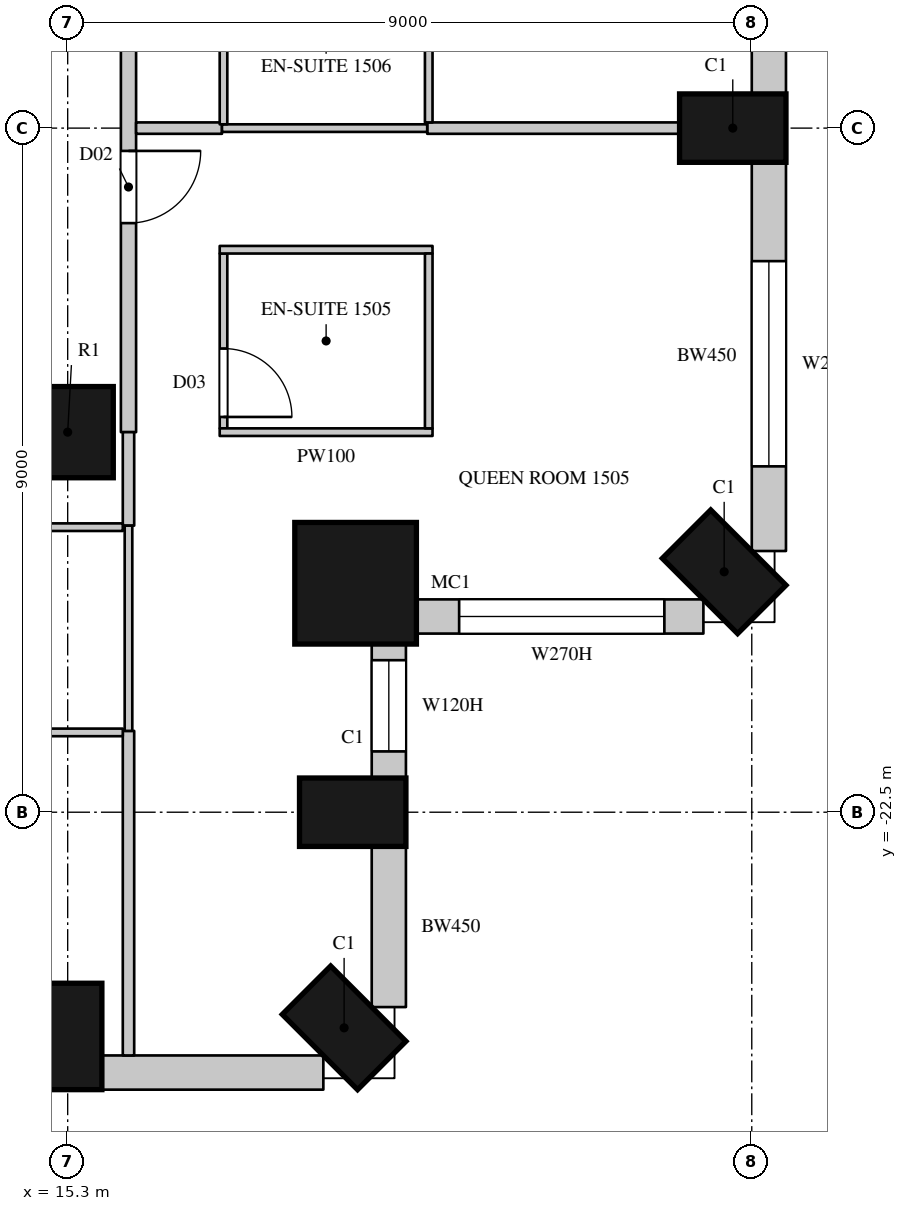
"""IFC4 building model, lengths in metres.
Left out: names, types, materials, properties, quantities, classifications, styles, units other than length and angle.
Written with IfcOpenShell. Run it as: python <this file> out.ifc"""

import sys

from ifc_helpers import new_model, si_unit, direction, frame, frame_2d, origin, origin_2d, place, context, subcontext, project, spatial, rectangle, circle, extrude, element, fill, save


model = new_model("IFC4")
c1 = context("Model", 3, precision=1e-05, world=origin(), true_north=direction((0.0, 1.0)))
c2 = subcontext(c1, "Body", "Model", "MODEL_VIEW")
j1 = project(units=[si_unit("LENGTHUNIT", "METRE"), si_unit("PLANEANGLEUNIT", "RADIAN")], contexts=[c1])
p1 = place(None, origin())
s1 = spatial("IfcSite", under=j1, at=p1, CompositionType="ELEMENT")
p2 = place(p1, origin())
s2 = spatial("IfcBuilding", under=s1, at=p2, CompositionType="ELEMENT")
p3 = place(p2, frame((0.0, 0.0, 84.3)))
s3 = spatial("IfcBuildingStorey", under=s2, at=p3, CompositionType="ELEMENT", Elevation=84.3)
for number, where, z_axis, x_axis in (
    (1, (15.3, -25.45, 0.0), (0.0, 0.0, 1.0), (1.0, 0.0, 0.0)),
    (2, (18.937, -25.337, 0.0), (0.0, 0.0, 1.0), (0.707, 0.707, 0.0)),
    (3, (19.05, -22.5, 0.0), (0.0, 0.0, 1.0), (0.0, 1.0, 0.0)),
):
    element("IfcColumn", number, at=place(p3, frame(where, z_axis=z_axis, x_axis=x_axis)), inside=s3, PredefinedType="COLUMN", context=c2, shape_type="SweptSolid", body=[
        extrude(rectangle(XDim=0.9, YDim=1.4, at=origin_2d()), origin(), (0.0, 0.0, 1.0), 3.6),
    ])
p4 = place(p3, frame((19.088, -19.488, 0.0), z_axis=(0.0, 0.0, 1.0), x_axis=(1.0, 0.0, 0.0)))
e4 = element("IfcColumn", 4, at=p4, inside=s3, PredefinedType="COLUMN", context=c2, shape_type="SweptSolid", body=[
    extrude(circle(Radius=0.8, at=origin_2d()), origin(), (0.0, 0.0, 1.0), 3.6),
])
for number, where, z_axis, x_axis in (
    (5, (23.937, -19.337, 0.0), (0.0, 0.0, 1.0), (0.707, 0.707, 0.0)),
    (6, (24.05, -13.5, 0.0), (0.0, 0.0, 1.0), (0.0, 1.0, 0.0)),
):
    element("IfcColumn", number, at=place(p3, frame(where, z_axis=z_axis, x_axis=x_axis)), inside=s3, PredefinedType="COLUMN", context=c2, shape_type="SweptSolid", body=[
        extrude(rectangle(XDim=0.9, YDim=1.4, at=origin_2d()), origin(), (0.0, 0.0, 1.0), 3.6),
    ])
p5 = place(p3, frame((15.3, -17.5, 0.0), z_axis=(0.0, 0.0, 1.0), x_axis=(1.0, 0.0, 0.0)))
e7 = element("IfcColumn", 7, at=p5, inside=s3, PredefinedType="COLUMN", context=c2, shape_type="SweptSolid", body=[
    extrude(circle(Radius=0.6, at=origin_2d()), origin(), (0.0, 0.0, 1.0), 3.6),
])
p6 = place(p3, frame((15.75, -25.925, 0.0), z_axis=(0.0, 0.0, 1.0), x_axis=(1.0, 0.0, 0.0)))
e8 = element("IfcWall", 8, at=p6, inside=s3, PredefinedType="SOLIDWALL", context=c2, shape_type="SweptSolid", body=[
    extrude(rectangle(XDim=2.914, YDim=0.45, at=frame_2d((1.457, 0.0))), origin(), (0.0, 0.0, 1.0), 3.3),
])
p7 = place(p3, frame((19.525, -25.064, 0.0), z_axis=(0.0, 0.0, 1.0), x_axis=(0.0, 1.0, 0.0)))
e9 = element("IfcWall", 9, at=p7, inside=s3, PredefinedType="SOLIDWALL", context=c2, shape_type="SweptSolid", body=[
    extrude(rectangle(XDim=2.114, YDim=0.45, at=frame_2d((1.057, 0.0))), origin(), (0.0, 0.0, 1.0), 3.3),
])
p8 = place(p3, frame((19.525, -22.05, 0.0), z_axis=(0.0, 0.0, 1.0), x_axis=(0.0, 1.0, 0.0)))
e10 = element("IfcWall", 10, at=p8, inside=s3, PredefinedType="SOLIDWALL", context=c2, shape_type="SweptSolid", body=[
    extrude(rectangle(XDim=1.792, YDim=0.45, at=frame_2d((0.896, 0.0))), origin(), (0.0, 0.0, 1.0), 3.3),
])
p9 = place(p8, frame((0.35, 0.0, 1.05)))
e11 = element("IfcOpeningElement", 11, at=p9, cuts=e10, PredefinedType="OPENING", context=c2, shape_type="SweptSolid", body=[
    extrude(rectangle(XDim=1.2, YDim=2.0, at=frame_2d((0.6, 1.0))), frame((0.0, 0.235, 0.0), z_axis=(0.0, -1.0, 0.0), x_axis=(1.0, 0.0, 0.0)), (0.0, 0.0, 1.0), 0.47),
])
p10 = place(p3, frame((19.858, -19.925, 0.0), z_axis=(0.0, 0.0, 1.0), x_axis=(1.0, 0.0, 0.0)))
e12 = element("IfcWall", 12, at=p10, inside=s3, PredefinedType="SOLIDWALL", context=c2, shape_type="SweptSolid", body=[
    extrude(rectangle(XDim=3.805, YDim=0.45, at=frame_2d((1.903, 0.0))), origin(), (0.0, 0.0, 1.0), 3.3),
])
p11 = place(p10, frame((0.592, 0.0, 1.05)))
e13 = element("IfcOpeningElement", 13, at=p11, cuts=e12, PredefinedType="OPENING", context=c2, shape_type="SweptSolid", body=[
    extrude(rectangle(XDim=2.7, YDim=2.0, at=frame_2d((1.35, 1.0))), frame((0.0, 0.235, 0.0), z_axis=(0.0, -1.0, 0.0), x_axis=(1.0, 0.0, 0.0)), (0.0, 0.0, 1.0), 0.47),
])
p12 = place(p3, frame((24.525, -19.064, 0.0), z_axis=(0.0, 0.0, 1.0), x_axis=(0.0, 1.0, 0.0)))
e14 = element("IfcWall", 14, at=p12, inside=s3, PredefinedType="SOLIDWALL", context=c2, shape_type="SweptSolid", body=[
    extrude(rectangle(XDim=5.114, YDim=0.45, at=frame_2d((2.557, 0.0))), origin(), (0.0, 0.0, 1.0), 3.3),
])
p13 = place(p12, frame((1.114, 0.0, 1.05)))
e15 = element("IfcOpeningElement", 15, at=p13, cuts=e14, PredefinedType="OPENING", context=c2, shape_type="SweptSolid", body=[
    extrude(rectangle(XDim=2.7, YDim=2.0, at=frame_2d((1.35, 1.0))), frame((0.0, 0.235, 0.0), z_axis=(0.0, -1.0, 0.0), x_axis=(1.0, 0.0, 0.0)), (0.0, 0.0, 1.0), 0.47),
])
p14 = place(p3, frame((24.525, -13.05, 0.0), z_axis=(0.0, 0.0, 1.0), x_axis=(0.0, 1.0, 0.0)))
e16 = element("IfcWall", 16, at=p14, inside=s3, PredefinedType="SOLIDWALL", context=c2, shape_type="SweptSolid", body=[
    extrude(rectangle(XDim=8.1, YDim=0.45, at=frame_2d((4.05, 0.0))), origin(), (0.0, 0.0, 1.0), 3.3),
])
p15 = place(p14, frame((0.9, 0.0, 0.0)))
e17 = element("IfcOpeningElement", 17, at=p15, cuts=e16, PredefinedType="OPENING", context=c2, shape_type="SweptSolid", body=[
    extrude(rectangle(XDim=1.8, YDim=2.4, at=frame_2d((0.9, 1.2))), frame((0.0, 0.235, 0.0), z_axis=(0.0, -1.0, 0.0), x_axis=(1.0, 0.0, 0.0)), (0.0, 0.0, 1.0), 0.47),
])
p16 = place(p14, frame((4.7, 0.0, 0.0)))
e18 = element("IfcOpeningElement", 18, at=p16, cuts=e16, PredefinedType="OPENING", context=c2, shape_type="SweptSolid", body=[
    extrude(rectangle(XDim=1.8, YDim=2.4, at=frame_2d((0.9, 1.2))), frame((0.0, 0.235, 0.0), z_axis=(0.0, -1.0, 0.0), x_axis=(1.0, 0.0, 0.0)), (0.0, 0.0, 1.0), 0.47),
])
p17 = place(p14, frame((6.7, 0.0, 1.05)))
e19 = element("IfcOpeningElement", 19, at=p17, cuts=e16, PredefinedType="OPENING", context=c2, shape_type="SweptSolid", body=[
    extrude(rectangle(XDim=1.2, YDim=2.0, at=frame_2d((0.6, 1.0))), frame((0.0, 0.235, 0.0), z_axis=(0.0, -1.0, 0.0), x_axis=(1.0, 0.0, 0.0)), (0.0, 0.0, 1.0), 0.47),
])
p18 = place(p3, frame((16.1, -17.5, 0.0), z_axis=(0.0, 0.0, 1.0), x_axis=(0.0, 1.0, 0.0)))
e20 = element("IfcWall", 20, at=p18, inside=s3, PredefinedType="PARTITIONING", context=c2, shape_type="SweptSolid", body=[
    extrude(rectangle(XDim=12.75, YDim=0.2, at=frame_2d((6.375, 0.0))), origin(), (0.0, 0.0, 1.0), 3.3),
])
p19 = place(p18, frame((2.75, 0.0, 0.0)))
e21 = element("IfcOpeningElement", 21, at=p19, cuts=e20, PredefinedType="OPENING", context=c2, shape_type="SweptSolid", body=[
    extrude(rectangle(XDim=0.95, YDim=2.2, at=frame_2d((0.475, 1.1))), frame((0.0, 0.11, 0.0), z_axis=(0.0, -1.0, 0.0), x_axis=(1.0, 0.0, 0.0)), (0.0, 0.0, 1.0), 0.22),
])
p20 = place(p18, frame((6.95, 0.0, 0.0)))
e22 = element("IfcOpeningElement", 22, at=p20, cuts=e20, PredefinedType="OPENING", context=c2, shape_type="SweptSolid", body=[
    extrude(rectangle(XDim=0.95, YDim=2.2, at=frame_2d((0.475, 1.1))), frame((0.0, 0.11, 0.0), z_axis=(0.0, -1.0, 0.0), x_axis=(1.0, 0.0, 0.0)), (0.0, 0.0, 1.0), 0.22),
])
p21 = place(p18, frame((11.4, 0.0, 0.0)))
e23 = element("IfcOpeningElement", 23, at=p21, cuts=e20, PredefinedType="OPENING", context=c2, shape_type="SweptSolid", body=[
    extrude(rectangle(XDim=0.95, YDim=2.2, at=frame_2d((0.475, 1.1))), frame((0.0, 0.11, 0.0), z_axis=(0.0, -1.0, 0.0), x_axis=(1.0, 0.0, 0.0)), (0.0, 0.0, 1.0), 0.22),
])
p22 = place(p3, frame((16.1, -25.7, 0.0), z_axis=(0.0, 0.0, 1.0), x_axis=(0.0, 1.0, 0.0)))
e24 = element("IfcWall", 24, at=p22, inside=s3, PredefinedType="PARTITIONING", context=c2, shape_type="SweptSolid", body=[
    extrude(rectangle(XDim=4.27, YDim=0.15, at=frame_2d((2.135, 0.0))), origin(), (0.0, 0.0, 1.0), 3.3),
])
p23 = place(p3, frame((16.1, -18.73, 0.0), z_axis=(0.0, 0.0, 1.0), x_axis=(0.0, 1.0, 0.0)))
e25 = element("IfcWall", 25, at=p23, inside=s3, PredefinedType="PARTITIONING", context=c2, shape_type="SweptSolid", body=[
    extrude(rectangle(XDim=1.23, YDim=0.15, at=frame_2d((0.615, 0.0))), origin(), (0.0, 0.0, 1.0), 3.3),
])
p24 = place(p3, frame((16.2, -13.5, 0.0), z_axis=(0.0, 0.0, 1.0), x_axis=(1.0, 0.0, 0.0)))
e26 = element("IfcWall", 26, at=p24, inside=s3, PredefinedType="PARTITIONING", context=c2, shape_type="SweptSolid", body=[
    extrude(rectangle(XDim=1.13, YDim=0.15, at=frame_2d((0.565, 0.0))), origin(), (0.0, 0.0, 1.0), 3.3),
])
p25 = place(p3, frame((20.03, -13.5, 0.0), z_axis=(0.0, 0.0, 1.0), x_axis=(1.0, 0.0, 0.0)))
e27 = element("IfcWall", 27, at=p25, inside=s3, PredefinedType="PARTITIONING", context=c2, shape_type="SweptSolid", body=[
    extrude(rectangle(XDim=3.32, YDim=0.15, at=frame_2d((1.66, 0.0))), origin(), (0.0, 0.0, 1.0), 3.3),
])
for number, where, z_axis, x_axis in (
    (28, (13.65, -21.45, 0.0), (0.0, 0.0, 1.0), (1.0, 0.0, 0.0)),
    (29, (13.65, -18.75, 0.0), (0.0, 0.0, 1.0), (1.0, 0.0, 0.0)),
):
    element("IfcWall", number, at=place(p3, frame(where, z_axis=z_axis, x_axis=x_axis)), inside=s3, PredefinedType="PARTITIONING", context=c2, shape_type="SweptSolid", body=[
        extrude(rectangle(XDim=2.375, YDim=0.1, at=frame_2d((1.188, 0.0))), origin(), (0.0, 0.0, 1.0), 3.3),
    ])
for number, where, z_axis, x_axis in (
    (30, (16.1, -21.43, 0.0), (0.0, 0.0, 1.0), (0.0, 1.0, 0.0)),
    (31, (17.33, -13.5, 0.0), (0.0, 0.0, 1.0), (1.0, 0.0, 0.0)),
):
    element("IfcWall", number, at=place(p3, frame(where, z_axis=z_axis, x_axis=x_axis)), inside=s3, PredefinedType="PARTITIONING", context=c2, shape_type="SweptSolid", body=[
        extrude(rectangle(XDim=2.7, YDim=0.1, at=frame_2d((1.35, 0.0))), origin(), (0.0, 0.0, 1.0), 3.3),
    ])
p26 = place(p3, frame((17.35, -17.45, 0.0), z_axis=(0.0, 0.0, 1.0), x_axis=(0.0, 1.0, 0.0)))
e32 = element("IfcWall", 32, at=p26, inside=s3, PredefinedType="PARTITIONING", context=c2, shape_type="SweptSolid", body=[
    extrude(rectangle(XDim=2.3, YDim=0.1, at=frame_2d((1.15, 0.0))), origin(), (0.0, 0.0, 1.0), 3.3),
])
p27 = place(p26, frame((0.15, 0.0, 0.0)))
e33 = element("IfcOpeningElement", 33, at=p27, cuts=e32, PredefinedType="OPENING", context=c2, shape_type="SweptSolid", body=[
    extrude(rectangle(XDim=0.9, YDim=2.2, at=frame_2d((0.45, 1.1))), frame((0.0, 0.06, 0.0), z_axis=(0.0, -1.0, 0.0), x_axis=(1.0, 0.0, 0.0)), (0.0, 0.0, 1.0), 0.12),
])
for number, where, z_axis, x_axis in (
    (34, (17.3, -17.5, 0.0), (0.0, 0.0, 1.0), (1.0, 0.0, 0.0)),
    (35, (17.3, -15.1, 0.0), (0.0, 0.0, 1.0), (1.0, 0.0, 0.0)),
):
    element("IfcWall", number, at=place(p3, frame(where, z_axis=z_axis, x_axis=x_axis)), inside=s3, PredefinedType="PARTITIONING", context=c2, shape_type="SweptSolid", body=[
        extrude(rectangle(XDim=2.8, YDim=0.1, at=frame_2d((1.4, 0.0))), origin(), (0.0, 0.0, 1.0), 3.3),
    ])
p28 = place(p3, frame((17.35, -13.45, 0.0), z_axis=(0.0, 0.0, 1.0), x_axis=(0.0, 1.0, 0.0)))
e36 = element("IfcWall", 36, at=p28, inside=s3, PredefinedType="PARTITIONING", context=c2, shape_type="SweptSolid", body=[
    extrude(rectangle(XDim=2.296, YDim=0.1, at=frame_2d((1.148, 0.0))), origin(), (0.0, 0.0, 1.0), 3.3),
])
p29 = place(p28, frame((1.2, 0.0, 0.0)))
e37 = element("IfcOpeningElement", 37, at=p29, cuts=e36, PredefinedType="OPENING", context=c2, shape_type="SweptSolid", body=[
    extrude(rectangle(XDim=0.9, YDim=2.2, at=frame_2d((0.45, 1.1))), frame((0.0, 0.06, 0.0), z_axis=(0.0, -1.0, 0.0), x_axis=(1.0, 0.0, 0.0)), (0.0, 0.0, 1.0), 0.12),
])
p30 = place(p3, frame((20.05, -17.45, 0.0), z_axis=(0.0, 0.0, 1.0), x_axis=(0.0, 1.0, 0.0)))
e38 = element("IfcWall", 38, at=p30, inside=s3, PredefinedType="PARTITIONING", context=c2, shape_type="SweptSolid", body=[
    extrude(rectangle(XDim=2.3, YDim=0.1, at=frame_2d((1.15, 0.0))), origin(), (0.0, 0.0, 1.0), 3.3),
])
p31 = place(p3, frame((20.05, -13.425, 0.0), z_axis=(0.0, 0.0, 1.0), x_axis=(0.0, 1.0, 0.0)))
e39 = element("IfcWall", 39, at=p31, inside=s3, PredefinedType="PARTITIONING", context=c2, shape_type="SweptSolid", body=[
    extrude(rectangle(XDim=2.271, YDim=0.1, at=frame_2d((1.135, 0.0))), origin(), (0.0, 0.0, 1.0), 3.3),
])
p32 = place(p9, origin())
e40 = element("IfcWindow", 40, at=p32, inside=s3, PartitioningType="SINGLE_PANEL", PredefinedType="WINDOW", context=c2, shape_type="SweptSolid", body=[
    extrude(rectangle(XDim=1.2, YDim=2.0, at=frame_2d((0.6, 1.0))), frame((0.0, 0.135, 0.0), z_axis=(0.0, -1.0, 0.0), x_axis=(1.0, 0.0, 0.0)), (0.0, 0.0, 1.0), 0.06),
])
fill(e11, e40)
p33 = place(p11, origin())
e41 = element("IfcWindow", 41, at=p33, inside=s3, PartitioningType="SINGLE_PANEL", PredefinedType="WINDOW", context=c2, shape_type="SweptSolid", body=[
    extrude(rectangle(XDim=2.7, YDim=2.0, at=frame_2d((1.35, 1.0))), frame((0.0, 0.135, 0.0), z_axis=(0.0, -1.0, 0.0), x_axis=(1.0, 0.0, 0.0)), (0.0, 0.0, 1.0), 0.06),
])
fill(e13, e41)
p34 = place(p13, origin())
e42 = element("IfcWindow", 42, at=p34, inside=s3, PartitioningType="SINGLE_PANEL", PredefinedType="WINDOW", context=c2, shape_type="SweptSolid", body=[
    extrude(rectangle(XDim=2.7, YDim=2.0, at=frame_2d((1.35, 1.0))), frame((0.0, 0.135, 0.0), z_axis=(0.0, -1.0, 0.0), x_axis=(1.0, 0.0, 0.0)), (0.0, 0.0, 1.0), 0.06),
])
fill(e15, e42)
p35 = place(p19, origin())
e43 = element("IfcDoor", 43, at=p35, inside=s3, OperationType="SINGLE_SWING_LEFT", PredefinedType="DOOR", context=c2, shape_type="SweptSolid", body=[
    extrude(rectangle(XDim=0.95, YDim=2.2, at=frame_2d((0.475, 1.1))), frame((0.0, 0.025, 0.0), z_axis=(0.0, -1.0, 0.0), x_axis=(1.0, 0.0, 0.0)), (0.0, 0.0, 1.0), 0.05),
])
fill(e21, e43)
p36 = place(p27, origin())
e44 = element("IfcDoor", 44, at=p36, inside=s3, OperationType="SINGLE_SWING_RIGHT", PredefinedType="DOOR", context=c2, shape_type="SweptSolid", body=[
    extrude(rectangle(XDim=0.9, YDim=2.2, at=frame_2d((0.45, 1.1))), frame((0.0, 0.025, 0.0), z_axis=(0.0, -1.0, 0.0), x_axis=(1.0, 0.0, 0.0)), (0.0, 0.0, 1.0), 0.05),
])
fill(e33, e44)
save(model, sys.argv[1])
